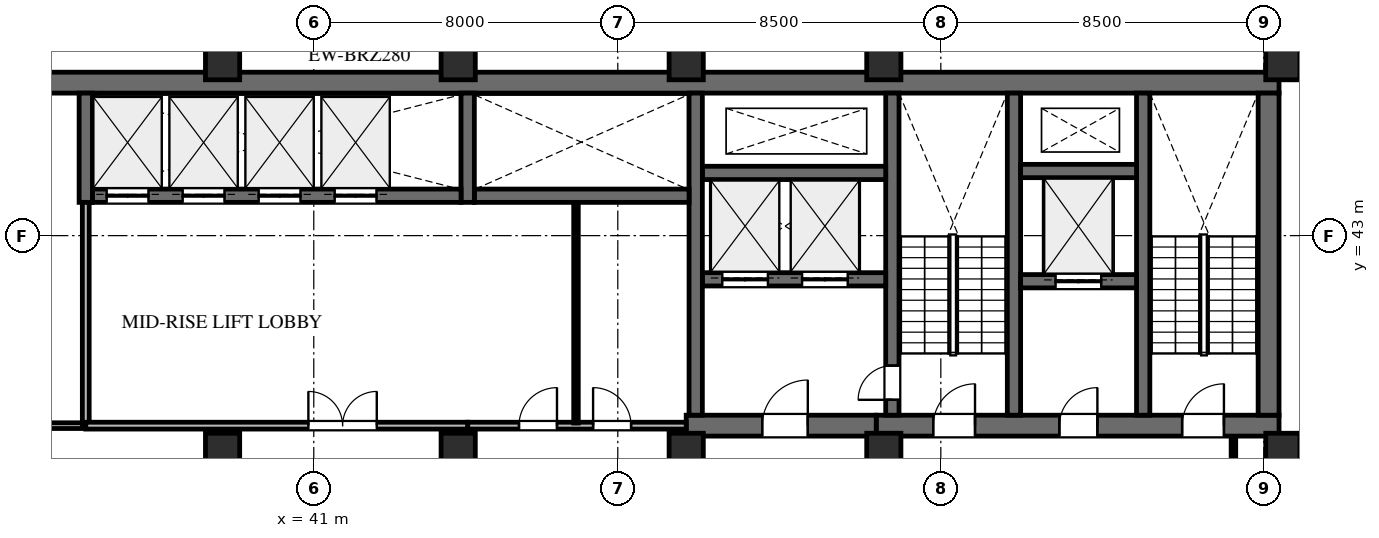
"""IFC4 building model, lengths in metres.
Left out: names, types, materials, properties, quantities, classifications, styles, units other than length and angle.
Written with IfcOpenShell. Run it as: python <this file> out.ifc"""

import sys

from ifc_helpers import new_model, si_unit, direction, frame, frame_2d, origin, origin_2d, place, context, subcontext, project, spatial, rectangle, extrude, element, fill, save


model = new_model("IFC4")
c1 = context("Model", 3, precision=1e-05, world=origin(), true_north=direction((0.0, 1.0)))
c2 = subcontext(c1, "Body", "Model", "MODEL_VIEW")
j1 = project(units=[si_unit("LENGTHUNIT", "METRE"), si_unit("PLANEANGLEUNIT", "RADIAN")], contexts=[c1])
p1 = place(None, origin())
s1 = spatial("IfcSite", under=j1, at=p1, CompositionType="ELEMENT")
p2 = place(p1, origin())
s2 = spatial("IfcBuilding", under=s1, at=p2, CompositionType="ELEMENT")
p3 = place(p2, frame((0.0, 0.0, 212.5)))
s3 = spatial("IfcBuildingStorey", under=s2, at=p3, CompositionType="ELEMENT", Elevation=212.5)
p4 = place(p3, frame((22.9, 47.025, 0.0), z_axis=(0.0, 0.0, 1.0), x_axis=(1.0, 0.0, 0.0)))
e1 = element("IfcWall", 1, at=p4, inside=s3, PredefinedType="SHEAR", context=c2, shape_type="SweptSolid", body=[
    extrude(rectangle(XDim=43.5, YDim=0.55, at=frame_2d((21.75, 0.0))), origin(), (0.0, 0.0, 1.0), 4.0),
])
p5 = place(p3, frame((55.8, 38.0, 0.0), z_axis=(0.0, 0.0, 1.0), x_axis=(1.0, 0.0, 0.0)))
e2 = element("IfcWall", 2, at=p5, inside=s3, PredefinedType="SHEAR", context=c2, shape_type="SweptSolid", body=[
    extrude(rectangle(XDim=10.6, YDim=0.55, at=frame_2d((5.3, 0.0))), origin(), (0.0, 0.0, 1.0), 4.0),
])
p6 = place(p5, frame((1.5, 0.0, 0.0)))
e3 = element("IfcOpeningElement", 3, at=p6, cuts=e2, PredefinedType="OPENING", context=c2, shape_type="SweptSolid", body=[
    extrude(rectangle(XDim=1.1, YDim=2.2, at=frame_2d((0.55, 1.1))), frame((0.0, 0.285, 0.0), z_axis=(0.0, -1.0, 0.0), x_axis=(1.0, 0.0, 0.0)), (0.0, 0.0, 1.0), 0.57),
])
p7 = place(p5, frame((4.82, 0.0, 0.0)))
e4 = element("IfcOpeningElement", 4, at=p7, cuts=e2, PredefinedType="OPENING", context=c2, shape_type="SweptSolid", body=[
    extrude(rectangle(XDim=1.0, YDim=2.15, at=frame_2d((0.5, 1.075))), frame((0.0, 0.285, 0.0), z_axis=(0.0, -1.0, 0.0), x_axis=(1.0, 0.0, 0.0)), (0.0, 0.0, 1.0), 0.57),
])
p8 = place(p5, frame((8.05, 0.0, 0.0)))
e5 = element("IfcOpeningElement", 5, at=p8, cuts=e2, PredefinedType="OPENING", context=c2, shape_type="SweptSolid", body=[
    extrude(rectangle(XDim=1.1, YDim=2.2, at=frame_2d((0.55, 1.1))), frame((0.0, 0.285, 0.0), z_axis=(0.0, -1.0, 0.0), x_axis=(1.0, 0.0, 0.0)), (0.0, 0.0, 1.0), 0.57),
])
p9 = place(p3, frame((66.125, 38.275, 0.0), z_axis=(0.0, 0.0, 1.0), x_axis=(0.0, 1.0, 0.0)))
e6 = element("IfcWall", 6, at=p9, inside=s3, PredefinedType="SHEAR", context=c2, shape_type="SweptSolid", body=[
    extrude(rectangle(XDim=8.475, YDim=0.55, at=frame_2d((4.238, 0.0))), origin(), (0.0, 0.0, 1.0), 4.0),
])
for number, where, z_axis, x_axis in (
    (7, (62.825, 38.275, 0.0), (0.0, 0.0, 1.0), (0.0, 1.0, 0.0)),
    (8, (59.425, 38.275, 0.0), (0.0, 0.0, 1.0), (0.0, 1.0, 0.0)),
):
    element("IfcWall", number, at=place(p3, frame(where, z_axis=z_axis, x_axis=x_axis)), inside=s3, PredefinedType="SHEAR", context=c2, shape_type="SweptSolid", body=[
        extrude(rectangle(XDim=8.475, YDim=0.35, at=frame_2d((4.238, 0.0))), origin(), (0.0, 0.0, 1.0), 4.0),
    ])
p10 = place(p3, frame((56.225, 38.275, 0.0), z_axis=(0.0, 0.0, 1.0), x_axis=(0.0, 1.0, 0.0)))
e9 = element("IfcWall", 9, at=p10, inside=s3, PredefinedType="SHEAR", context=c2, shape_type="SweptSolid", body=[
    extrude(rectangle(XDim=8.475, YDim=0.35, at=frame_2d((4.238, 0.0))), origin(), (0.0, 0.0, 1.0), 4.0),
])
p11 = place(p10, frame((0.405, 0.0, 0.0)))
e10 = element("IfcOpeningElement", 10, at=p11, cuts=e9, PredefinedType="OPENING", context=c2, shape_type="SweptSolid", body=[
    extrude(rectangle(XDim=0.9, YDim=2.15, at=frame_2d((0.45, 1.075))), frame((0.0, 0.185, 0.0), z_axis=(0.0, -1.0, 0.0), x_axis=(1.0, 0.0, 0.0)), (0.0, 0.0, 1.0), 0.37),
])
p12 = place(p3, frame((59.6, 41.8, 0.0), z_axis=(0.0, 0.0, 1.0), x_axis=(1.0, 0.0, 0.0)))
e11 = element("IfcWall", 11, at=p12, inside=s3, PredefinedType="SHEAR", context=c2, shape_type="SweptSolid", body=[
    extrude(rectangle(XDim=3.05, YDim=0.35, at=frame_2d((1.525, 0.0))), origin(), (0.0, 0.0, 1.0), 4.0),
])
p13 = place(p12, frame((0.92, 0.0, 0.0)))
e12 = element("IfcOpeningElement", 12, at=p13, cuts=e11, PredefinedType="OPENING", context=c2, shape_type="SweptSolid", body=[
    extrude(rectangle(XDim=1.2, YDim=2.2, at=frame_2d((0.6, 1.1))), frame((0.0, 0.185, 0.0), z_axis=(0.0, -1.0, 0.0), x_axis=(1.0, 0.0, 0.0)), (0.0, 0.0, 1.0), 0.37),
])
p14 = place(p3, frame((59.6, 44.7, 0.0), z_axis=(0.0, 0.0, 1.0), x_axis=(1.0, 0.0, 0.0)))
e13 = element("IfcWall", 13, at=p14, inside=s3, PredefinedType="SHEAR", context=c2, shape_type="SweptSolid", body=[
    extrude(rectangle(XDim=3.05, YDim=0.35, at=frame_2d((1.525, 0.0))), origin(), (0.0, 0.0, 1.0), 4.0),
])
p15 = place(p3, frame((50.8, 38.0, 0.0), z_axis=(0.0, 0.0, 1.0), x_axis=(1.0, 0.0, 0.0)))
e14 = element("IfcWall", 14, at=p15, inside=s3, PredefinedType="SHEAR", context=c2, shape_type="SweptSolid", body=[
    extrude(rectangle(XDim=5.0, YDim=0.55, at=frame_2d((2.5, 0.0))), origin(), (0.0, 0.0, 1.0), 4.0),
])
p16 = place(p15, frame((2.0, 0.0, 0.0)))
e15 = element("IfcOpeningElement", 15, at=p16, cuts=e14, PredefinedType="OPENING", context=c2, shape_type="SweptSolid", body=[
    extrude(rectangle(XDim=1.2, YDim=2.2, at=frame_2d((0.6, 1.1))), frame((0.0, 0.285, 0.0), z_axis=(0.0, -1.0, 0.0), x_axis=(1.0, 0.0, 0.0)), (0.0, 0.0, 1.0), 0.57),
])
p17 = place(p3, frame((51.225, 41.85, 0.0), z_axis=(0.0, 0.0, 1.0), x_axis=(1.0, 0.0, 0.0)))
e16 = element("IfcWall", 16, at=p17, inside=s3, PredefinedType="SHEAR", context=c2, shape_type="SweptSolid", body=[
    extrude(rectangle(XDim=4.825, YDim=0.35, at=frame_2d((2.413, 0.0))), origin(), (0.0, 0.0, 1.0), 4.0),
])
p18 = place(p17, frame((0.525, 0.0, 0.0)))
e17 = element("IfcOpeningElement", 17, at=p18, cuts=e16, PredefinedType="OPENING", context=c2, shape_type="SweptSolid", body=[
    extrude(rectangle(XDim=1.2, YDim=2.2, at=frame_2d((0.6, 1.1))), frame((0.0, 0.185, 0.0), z_axis=(0.0, -1.0, 0.0), x_axis=(1.0, 0.0, 0.0)), (0.0, 0.0, 1.0), 0.37),
])
p19 = place(p17, frame((2.625, 0.0, 0.0)))
e18 = element("IfcOpeningElement", 18, at=p19, cuts=e16, PredefinedType="OPENING", context=c2, shape_type="SweptSolid", body=[
    extrude(rectangle(XDim=1.2, YDim=2.2, at=frame_2d((0.6, 1.1))), frame((0.0, 0.185, 0.0), z_axis=(0.0, -1.0, 0.0), x_axis=(1.0, 0.0, 0.0)), (0.0, 0.0, 1.0), 0.37),
])
p20 = place(p3, frame((51.225, 44.65, 0.0), z_axis=(0.0, 0.0, 1.0), x_axis=(1.0, 0.0, 0.0)))
e19 = element("IfcWall", 19, at=p20, inside=s3, PredefinedType="SHEAR", context=c2, shape_type="SweptSolid", body=[
    extrude(rectangle(XDim=4.825, YDim=0.35, at=frame_2d((2.413, 0.0))), origin(), (0.0, 0.0, 1.0), 4.0),
])
p21 = place(p3, frame((51.05, 38.275, 0.0), z_axis=(0.0, 0.0, 1.0), x_axis=(0.0, 1.0, 0.0)))
e20 = element("IfcWall", 20, at=p21, inside=s3, PredefinedType="SHEAR", context=c2, shape_type="SweptSolid", body=[
    extrude(rectangle(XDim=8.475, YDim=0.35, at=frame_2d((4.238, 0.0))), origin(), (0.0, 0.0, 1.0), 4.0),
])
p22 = place(p3, frame((45.225, 44.05, 0.0), z_axis=(0.0, 0.0, 1.0), x_axis=(1.0, 0.0, 0.0)))
e21 = element("IfcWall", 21, at=p22, inside=s3, PredefinedType="SHEAR", context=c2, shape_type="SweptSolid", body=[
    extrude(rectangle(XDim=5.65, YDim=0.35, at=frame_2d((2.825, 0.0))), origin(), (0.0, 0.0, 1.0), 4.0),
])
p23 = place(p3, frame((45.05, 43.875, 0.0), z_axis=(0.0, 0.0, 1.0), x_axis=(0.0, 1.0, 0.0)))
e22 = element("IfcWall", 22, at=p23, inside=s3, PredefinedType="SHEAR", context=c2, shape_type="SweptSolid", body=[
    extrude(rectangle(XDim=2.875, YDim=0.35, at=frame_2d((1.438, 0.0))), origin(), (0.0, 0.0, 1.0), 4.0),
])
p24 = place(p3, frame((35.175, 44.05, 0.0), z_axis=(0.0, 0.0, 1.0), x_axis=(1.0, 0.0, 0.0)))
e23 = element("IfcWall", 23, at=p24, inside=s3, PredefinedType="SHEAR", context=c2, shape_type="SweptSolid", body=[
    extrude(rectangle(XDim=9.7, YDim=0.35, at=frame_2d((4.85, 0.0))), origin(), (0.0, 0.0, 1.0), 4.0),
])
p25 = place(p24, frame((0.375, 0.0, 0.0)))
e24 = element("IfcOpeningElement", 24, at=p25, cuts=e23, PredefinedType="OPENING", context=c2, shape_type="SweptSolid", body=[
    extrude(rectangle(XDim=1.1, YDim=2.2, at=frame_2d((0.55, 1.1))), frame((0.0, 0.185, 0.0), z_axis=(0.0, -1.0, 0.0), x_axis=(1.0, 0.0, 0.0)), (0.0, 0.0, 1.0), 0.37),
])
p26 = place(p24, frame((2.375, 0.0, 0.0)))
e25 = element("IfcOpeningElement", 25, at=p26, cuts=e23, PredefinedType="OPENING", context=c2, shape_type="SweptSolid", body=[
    extrude(rectangle(XDim=1.1, YDim=2.2, at=frame_2d((0.55, 1.1))), frame((0.0, 0.185, 0.0), z_axis=(0.0, -1.0, 0.0), x_axis=(1.0, 0.0, 0.0)), (0.0, 0.0, 1.0), 0.37),
])
p27 = place(p24, frame((4.375, 0.0, 0.0)))
e26 = element("IfcOpeningElement", 26, at=p27, cuts=e23, PredefinedType="OPENING", context=c2, shape_type="SweptSolid", body=[
    extrude(rectangle(XDim=1.1, YDim=2.2, at=frame_2d((0.55, 1.1))), frame((0.0, 0.185, 0.0), z_axis=(0.0, -1.0, 0.0), x_axis=(1.0, 0.0, 0.0)), (0.0, 0.0, 1.0), 0.37),
])
p28 = place(p24, frame((6.375, 0.0, 0.0)))
e27 = element("IfcOpeningElement", 27, at=p28, cuts=e23, PredefinedType="OPENING", context=c2, shape_type="SweptSolid", body=[
    extrude(rectangle(XDim=1.1, YDim=2.2, at=frame_2d((0.55, 1.1))), frame((0.0, 0.185, 0.0), z_axis=(0.0, -1.0, 0.0), x_axis=(1.0, 0.0, 0.0)), (0.0, 0.0, 1.0), 0.37),
])
p29 = place(p3, frame((35.0, 43.875, 0.0), z_axis=(0.0, 0.0, 1.0), x_axis=(0.0, 1.0, 0.0)))
e28 = element("IfcWall", 28, at=p29, inside=s3, PredefinedType="SHEAR", context=c2, shape_type="SweptSolid", body=[
    extrude(rectangle(XDim=2.875, YDim=0.35, at=frame_2d((1.438, 0.0))), origin(), (0.0, 0.0, 1.0), 4.0),
])
for number, where, z_axis, x_axis in (
    (29, (66.5, 47.55, 0.0), (0.0, 0.0, 1.0), (1.0, 0.0, 0.0)),
    (30, (56.0, 47.55, 0.0), (0.0, 0.0, 1.0), (1.0, 0.0, 0.0)),
    (31, (66.5, 37.35, 0.0), (0.0, 0.0, 1.0), (1.0, 0.0, 0.0)),
    (32, (56.0, 37.35, 0.0), (0.0, 0.0, 1.0), (1.0, 0.0, 0.0)),
    (33, (50.8, 47.55, 0.0), (0.0, 0.0, 1.0), (1.0, 0.0, 0.0)),
    (34, (50.8, 37.35, 0.0), (0.0, 0.0, 1.0), (1.0, 0.0, 0.0)),
    (35, (44.8, 37.35, 0.0), (0.0, 0.0, 1.0), (1.0, 0.0, 0.0)),
    (36, (44.8, 47.55, 0.0), (0.0, 0.0, 1.0), (1.0, 0.0, 0.0)),
    (37, (38.6, 37.35, 0.0), (0.0, 0.0, 1.0), (1.0, 0.0, 0.0)),
    (38, (38.6, 47.55, 0.0), (0.0, 0.0, 1.0), (1.0, 0.0, 0.0)),
):
    element("IfcColumn", number, at=place(p3, frame(where, z_axis=z_axis, x_axis=x_axis)), inside=s3, PredefinedType="COLUMN", context=c2, shape_type="SweptSolid", body=[
        extrude(rectangle(XDim=0.9, YDim=0.9, at=origin_2d()), origin(), (0.0, 0.0, 1.0), 4.0),
    ])
p30 = place(p3, frame((68.375, 37.8, 0.0), z_axis=(0.0, 0.0, 1.0), x_axis=(-0.139173290738, -0.99026804207, 0.0)))
e39 = element("IfcWall", 39, at=p30, inside=s3, PredefinedType="STANDARD", context=c2, shape_type="SweptSolid", body=[
    extrude(rectangle(XDim=24.498, YDim=0.28, at=frame_2d((12.249, 0.0))), origin(), (0.0, 0.0, 1.0), 3.755),
])
p31 = place(p30, frame((7.996, 0.0, 0.0)))
e40 = element("IfcOpeningElement", 40, at=p31, cuts=e39, PredefinedType="OPENING", context=c2, shape_type="SweptSolid", body=[
    extrude(rectangle(XDim=1.0, YDim=2.15, at=frame_2d((0.5, 1.075))), frame((0.0, 0.15, 0.0), z_axis=(0.0, -1.0, 0.0), x_axis=(1.0, 0.0, 0.0)), (0.0, 0.0, 1.0), 0.3),
])
p32 = place(p30, frame((3.749, 0.0, 0.65)))
e41 = element("IfcOpeningElement", 41, at=p32, cuts=e39, PredefinedType="OPENING", context=c2, shape_type="SweptSolid", body=[
    extrude(rectangle(XDim=1.8, YDim=2.1, at=frame_2d((0.9, 1.05))), frame((0.0, 0.15, 0.0), z_axis=(0.0, -1.0, 0.0), x_axis=(1.0, 0.0, 0.0)), (0.0, 0.0, 1.0), 0.3),
])
p33 = place(p30, frame((15.571, 0.0, 0.65)))
e42 = element("IfcOpeningElement", 42, at=p33, cuts=e39, PredefinedType="OPENING", context=c2, shape_type="SweptSolid", body=[
    extrude(rectangle(XDim=1.8, YDim=2.1, at=frame_2d((0.9, 1.05))), frame((0.0, 0.15, 0.0), z_axis=(0.0, -1.0, 0.0), x_axis=(1.0, 0.0, 0.0)), (0.0, 0.0, 1.0), 0.3),
])
p34 = place(p3, frame((45.05, 38.0, 0.0), z_axis=(0.0, 0.0, 1.0), x_axis=(1.0, 0.0, 0.0)))
e43 = element("IfcWall", 43, at=p34, inside=s3, PredefinedType="STANDARD", context=c2, shape_type="SweptSolid", body=[
    extrude(rectangle(XDim=5.75, YDim=0.18, at=frame_2d((2.875, 0.0))), origin(), (0.0, 0.0, 1.0), 2.982),
])
p35 = place(p34, frame((1.35, 0.0, 0.0)))
e44 = element("IfcOpeningElement", 44, at=p35, cuts=e43, PredefinedType="OPENING", context=c2, shape_type="SweptSolid", body=[
    extrude(rectangle(XDim=1.0, YDim=2.15, at=frame_2d((0.5, 1.075))), frame((0.0, 0.1, 0.0), z_axis=(0.0, -1.0, 0.0), x_axis=(1.0, 0.0, 0.0)), (0.0, 0.0, 1.0), 0.2),
])
p36 = place(p34, frame((3.3, 0.0, 0.0)))
e45 = element("IfcOpeningElement", 45, at=p36, cuts=e43, PredefinedType="OPENING", context=c2, shape_type="SweptSolid", body=[
    extrude(rectangle(XDim=1.0, YDim=2.15, at=frame_2d((0.5, 1.075))), frame((0.0, 0.1, 0.0), z_axis=(0.0, -1.0, 0.0), x_axis=(1.0, 0.0, 0.0)), (0.0, 0.0, 1.0), 0.2),
])
p37 = place(p3, frame((47.9, 38.068, 0.0), z_axis=(0.0, 0.0, 1.0), x_axis=(0.0, 1.0, 0.0)))
e46 = element("IfcWall", 46, at=p37, inside=s3, PredefinedType="PARTITIONING", context=c2, shape_type="SweptSolid", body=[
    extrude(rectangle(XDim=5.799, YDim=0.12, at=frame_2d((2.899, 0.0))), origin(), (0.0, 0.0, 1.0), 3.755),
])
p38 = place(p3, frame((27.05, 38.0, 0.0), z_axis=(0.0, 0.0, 1.0), x_axis=(1.0, 0.0, 0.0)))
e47 = element("IfcWall", 47, at=p38, inside=s3, PredefinedType="PARTITIONING", context=c2, shape_type="SweptSolid", body=[
    extrude(rectangle(XDim=7.95, YDim=0.15, at=frame_2d((3.975, 0.0))), origin(), (0.0, 0.0, 1.0), 2.982),
])
p39 = place(p38, frame((2.25, 0.0, 0.0)))
e48 = element("IfcOpeningElement", 48, at=p39, cuts=e47, PredefinedType="OPENING", context=c2, shape_type="SweptSolid", body=[
    extrude(rectangle(XDim=1.5, YDim=2.2, at=frame_2d((0.75, 1.1))), frame((0.0, 0.085, 0.0), z_axis=(0.0, -1.0, 0.0), x_axis=(1.0, 0.0, 0.0)), (0.0, 0.0, 1.0), 0.17),
])
p40 = place(p3, frame((35.0, 38.0, 0.0), z_axis=(0.0, 0.0, 1.0), x_axis=(0.0, 1.0, 0.0)))
e49 = element("IfcWall", 49, at=p40, inside=s3, PredefinedType="STANDARD", context=c2, shape_type="SweptSolid", body=[
    extrude(rectangle(XDim=5.875, YDim=0.18, at=frame_2d((2.938, 0.0))), origin(), (0.0, 0.0, 1.0), 3.755),
])
p41 = place(p3, frame((35.0, 38.0, 0.0), z_axis=(0.0, 0.0, 1.0), x_axis=(1.0, 0.0, 0.0)))
e50 = element("IfcWall", 50, at=p41, inside=s3, PredefinedType="STANDARD", context=c2, shape_type="SweptSolid", body=[
    extrude(rectangle(XDim=10.05, YDim=0.18, at=frame_2d((5.025, 0.0))), origin(), (0.0, 0.0, 1.0), 2.982),
])
p42 = place(p41, frame((5.858, 0.0, 0.0)))
e51 = element("IfcOpeningElement", 51, at=p42, cuts=e50, PredefinedType="OPENING", context=c2, shape_type="SweptSolid", body=[
    extrude(rectangle(XDim=1.8, YDim=2.2, at=frame_2d((0.9, 1.1))), frame((0.0, 0.1, 0.0), z_axis=(0.0, -1.0, 0.0), x_axis=(1.0, 0.0, 0.0)), (0.0, 0.0, 1.0), 0.2),
])
p43 = place(p3, frame((65.2, 34.4, 0.0), z_axis=(0.0, 0.0, 1.0), x_axis=(0.0, 1.0, 0.0)))
e52 = element("IfcWall", 52, at=p43, inside=s3, PredefinedType="PARTITIONING", context=c2, shape_type="SweptSolid", body=[
    extrude(rectangle(XDim=3.317, YDim=0.12, at=frame_2d((1.659, 0.0))), origin(), (0.0, 0.0, 1.0), 2.982),
])
p44 = place(p6, origin())
e53 = element("IfcDoor", 53, at=p44, inside=s3, OperationType="SINGLE_SWING_RIGHT", PredefinedType="DOOR", context=c2, shape_type="SweptSolid", body=[
    extrude(rectangle(XDim=1.1, YDim=2.2, at=frame_2d((0.55, 1.1))), frame((0.0, 0.025, 0.0), z_axis=(0.0, -1.0, 0.0), x_axis=(1.0, 0.0, 0.0)), (0.0, 0.0, 1.0), 0.05),
])
fill(e3, e53)
p45 = place(p7, origin())
e54 = element("IfcDoor", 54, at=p45, inside=s3, OperationType="SINGLE_SWING_RIGHT", PredefinedType="DOOR", context=c2, shape_type="SweptSolid", body=[
    extrude(rectangle(XDim=1.0, YDim=2.15, at=frame_2d((0.5, 1.075))), frame((0.0, 0.025, 0.0), z_axis=(0.0, -1.0, 0.0), x_axis=(1.0, 0.0, 0.0)), (0.0, 0.0, 1.0), 0.05),
])
fill(e4, e54)
p46 = place(p8, origin())
e55 = element("IfcDoor", 55, at=p46, inside=s3, OperationType="SINGLE_SWING_RIGHT", PredefinedType="DOOR", context=c2, shape_type="SweptSolid", body=[
    extrude(rectangle(XDim=1.1, YDim=2.2, at=frame_2d((0.55, 1.1))), frame((0.0, 0.025, 0.0), z_axis=(0.0, -1.0, 0.0), x_axis=(1.0, 0.0, 0.0)), (0.0, 0.0, 1.0), 0.05),
])
fill(e5, e55)
p47 = place(p16, origin())
e56 = element("IfcDoor", 56, at=p47, inside=s3, OperationType="SINGLE_SWING_RIGHT", PredefinedType="DOOR", context=c2, shape_type="SweptSolid", body=[
    extrude(rectangle(XDim=1.2, YDim=2.2, at=frame_2d((0.6, 1.1))), frame((0.0, 0.025, 0.0), z_axis=(0.0, -1.0, 0.0), x_axis=(1.0, 0.0, 0.0)), (0.0, 0.0, 1.0), 0.05),
])
fill(e15, e56)
p48 = place(p11, origin())
e57 = element("IfcDoor", 57, at=p48, inside=s3, OperationType="SINGLE_SWING_LEFT", PredefinedType="DOOR", context=c2, shape_type="SweptSolid", body=[
    extrude(rectangle(XDim=0.9, YDim=2.15, at=frame_2d((0.45, 1.075))), frame((0.0, 0.025, 0.0), z_axis=(0.0, -1.0, 0.0), x_axis=(1.0, 0.0, 0.0)), (0.0, 0.0, 1.0), 0.05),
])
fill(e10, e57)
p49 = place(p25, origin())
e58 = element("IfcDoor", 58, at=p49, inside=s3, OperationType="DOUBLE_DOOR_SLIDING", PredefinedType="DOOR", context=c2, shape_type="SweptSolid", body=[
    extrude(rectangle(XDim=1.1, YDim=2.2, at=frame_2d((0.55, 1.1))), frame((0.0, 0.025, 0.0), z_axis=(0.0, -1.0, 0.0), x_axis=(1.0, 0.0, 0.0)), (0.0, 0.0, 1.0), 0.05),
])
fill(e24, e58)
p50 = place(p26, origin())
e59 = element("IfcDoor", 59, at=p50, inside=s3, OperationType="DOUBLE_DOOR_SLIDING", PredefinedType="DOOR", context=c2, shape_type="SweptSolid", body=[
    extrude(rectangle(XDim=1.1, YDim=2.2, at=frame_2d((0.55, 1.1))), frame((0.0, 0.025, 0.0), z_axis=(0.0, -1.0, 0.0), x_axis=(1.0, 0.0, 0.0)), (0.0, 0.0, 1.0), 0.05),
])
fill(e25, e59)
p51 = place(p27, origin())
e60 = element("IfcDoor", 60, at=p51, inside=s3, OperationType="DOUBLE_DOOR_SLIDING", PredefinedType="DOOR", context=c2, shape_type="SweptSolid", body=[
    extrude(rectangle(XDim=1.1, YDim=2.2, at=frame_2d((0.55, 1.1))), frame((0.0, 0.025, 0.0), z_axis=(0.0, -1.0, 0.0), x_axis=(1.0, 0.0, 0.0)), (0.0, 0.0, 1.0), 0.05),
])
fill(e26, e60)
p52 = place(p28, origin())
e61 = element("IfcDoor", 61, at=p52, inside=s3, OperationType="DOUBLE_DOOR_SLIDING", PredefinedType="DOOR", context=c2, shape_type="SweptSolid", body=[
    extrude(rectangle(XDim=1.1, YDim=2.2, at=frame_2d((0.55, 1.1))), frame((0.0, 0.025, 0.0), z_axis=(0.0, -1.0, 0.0), x_axis=(1.0, 0.0, 0.0)), (0.0, 0.0, 1.0), 0.05),
])
fill(e27, e61)
p53 = place(p18, origin())
e62 = element("IfcDoor", 62, at=p53, inside=s3, OperationType="DOUBLE_DOOR_SLIDING", PredefinedType="DOOR", context=c2, shape_type="SweptSolid", body=[
    extrude(rectangle(XDim=1.2, YDim=2.2, at=frame_2d((0.6, 1.1))), frame((0.0, 0.025, 0.0), z_axis=(0.0, -1.0, 0.0), x_axis=(1.0, 0.0, 0.0)), (0.0, 0.0, 1.0), 0.05),
])
fill(e17, e62)
p54 = place(p19, origin())
e63 = element("IfcDoor", 63, at=p54, inside=s3, OperationType="DOUBLE_DOOR_SLIDING", PredefinedType="DOOR", context=c2, shape_type="SweptSolid", body=[
    extrude(rectangle(XDim=1.2, YDim=2.2, at=frame_2d((0.6, 1.1))), frame((0.0, 0.025, 0.0), z_axis=(0.0, -1.0, 0.0), x_axis=(1.0, 0.0, 0.0)), (0.0, 0.0, 1.0), 0.05),
])
fill(e18, e63)
p55 = place(p13, origin())
e64 = element("IfcDoor", 64, at=p55, inside=s3, OperationType="DOUBLE_DOOR_SLIDING", PredefinedType="DOOR", context=c2, shape_type="SweptSolid", body=[
    extrude(rectangle(XDim=1.2, YDim=2.2, at=frame_2d((0.6, 1.1))), frame((0.0, 0.025, 0.0), z_axis=(0.0, -1.0, 0.0), x_axis=(1.0, 0.0, 0.0)), (0.0, 0.0, 1.0), 0.05),
])
fill(e12, e64)
p56 = place(p35, origin())
e65 = element("IfcDoor", 65, at=p56, inside=s3, OperationType="SINGLE_SWING_RIGHT", PredefinedType="DOOR", context=c2, shape_type="SweptSolid", body=[
    extrude(rectangle(XDim=1.0, YDim=2.15, at=frame_2d((0.5, 1.075))), frame((0.0, 0.025, 0.0), z_axis=(0.0, -1.0, 0.0), x_axis=(1.0, 0.0, 0.0)), (0.0, 0.0, 1.0), 0.05),
])
fill(e44, e65)
p57 = place(p36, origin())
e66 = element("IfcDoor", 66, at=p57, inside=s3, OperationType="SINGLE_SWING_LEFT", PredefinedType="DOOR", context=c2, shape_type="SweptSolid", body=[
    extrude(rectangle(XDim=1.0, YDim=2.15, at=frame_2d((0.5, 1.075))), frame((0.0, 0.025, 0.0), z_axis=(0.0, -1.0, 0.0), x_axis=(1.0, 0.0, 0.0)), (0.0, 0.0, 1.0), 0.05),
])
fill(e45, e66)
p58 = place(p42, origin())
e67 = element("IfcDoor", 67, at=p58, inside=s3, OperationType="DOUBLE_DOOR_SINGLE_SWING", PredefinedType="DOOR", context=c2, shape_type="SweptSolid", body=[
    extrude(rectangle(XDim=1.8, YDim=2.2, at=frame_2d((0.9, 1.1))), frame((0.0, 0.025, 0.0), z_axis=(0.0, -1.0, 0.0), x_axis=(1.0, 0.0, 0.0)), (0.0, 0.0, 1.0), 0.05),
])
fill(e51, e67)
save(model, sys.argv[1])
